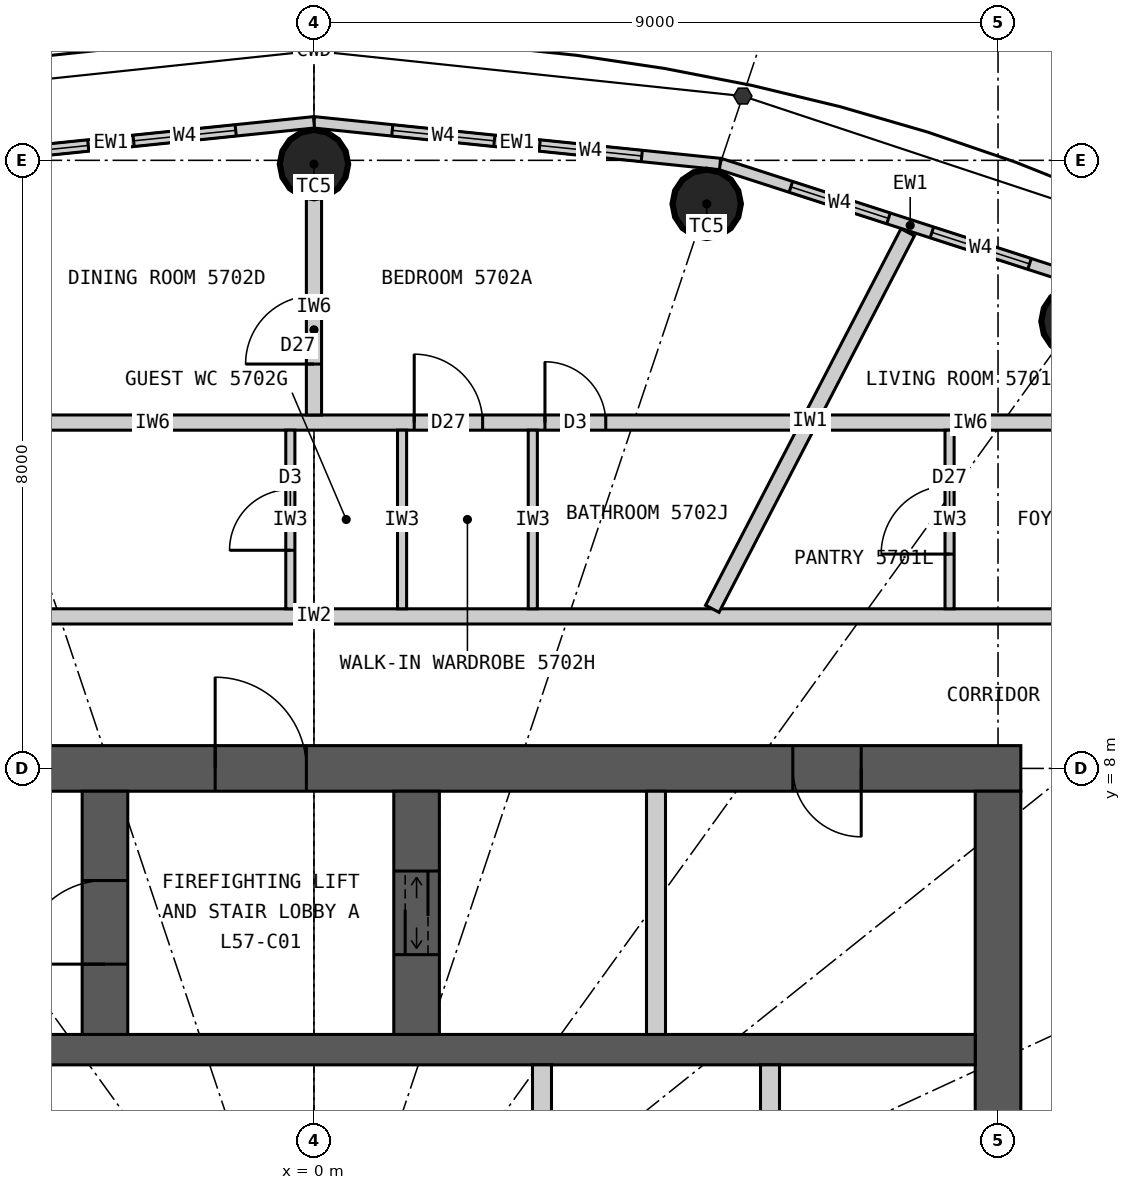
"""IFC4 building model, lengths in metres.
Left out: names, types, materials, properties, quantities, classifications, styles, units other than length and angle.
Written with IfcOpenShell. Run it as: python <this file> out.ifc"""

import sys

from ifc_helpers import new_model, si_unit, direction, frame, frame_2d, origin, origin_2d, place, context, subcontext, project, spatial, rectangle, circle, extrude, element, fill, save


model = new_model("IFC4")
c1 = context("Model", 3, precision=1e-05, world=origin(), true_north=direction((0.0, 1.0)))
c2 = subcontext(c1, "Body", "Model", "MODEL_VIEW")
j1 = project(units=[si_unit("LENGTHUNIT", "METRE"), si_unit("PLANEANGLEUNIT", "RADIAN")], contexts=[c1])
p1 = place(None, origin())
s1 = spatial("IfcSite", under=j1, at=p1, CompositionType="ELEMENT")
p2 = place(p1, origin())
s2 = spatial("IfcBuilding", under=s1, at=p2, CompositionType="ELEMENT")
p3 = place(p2, frame((0.0, 0.0, 212.7)))
s3 = spatial("IfcBuildingStorey", under=s2, at=p3, CompositionType="ELEMENT", Elevation=212.7)
for number, where, z_axis, x_axis in (
    (1, (10.019, 13.883, 0.0), (0.0, 0.0, 1.0), (1.0, 0.0, 0.0)),
    (2, (5.167, 15.427, 0.0), (0.0, 0.0, 1.0), (1.0, 0.0, 0.0)),
    (3, (0.0, 15.95, 0.0), (0.0, 0.0, 1.0), (1.0, 0.0, 0.0)),
):
    element("IfcColumn", number, at=place(p3, frame(where, z_axis=z_axis, x_axis=x_axis)), inside=s3, PredefinedType="COLUMN", context=c2, shape_type="SweptSolid", body=[
        extrude(circle(Radius=0.45, at=origin_2d()), origin(), (0.0, 0.0, 1.0), 3.3),
    ])
p4 = place(p3, frame((-9.3, 8.0, 0.0), z_axis=(0.0, 0.0, 1.0), x_axis=(1.0, 0.0, 0.0)))
e4 = element("IfcWall", 4, at=p4, inside=s3, PredefinedType="SHEAR", context=c2, shape_type="SweptSolid", body=[
    extrude(rectangle(XDim=18.6, YDim=0.6, at=frame_2d((9.3, 0.0))), origin(), (0.0, 0.0, 1.0), 3.3),
])
p5 = place(p4, frame((8.0, 0.0, 0.0)))
e5 = element("IfcOpeningElement", 5, at=p5, cuts=e4, PredefinedType="OPENING", context=c2, shape_type="SweptSolid", body=[
    extrude(rectangle(XDim=1.2, YDim=2.2, at=frame_2d((0.6, 1.1))), frame((0.0, 0.31, 0.0), z_axis=(0.0, -1.0, 0.0), x_axis=(1.0, 0.0, 0.0)), (0.0, 0.0, 1.0), 0.62),
])
p6 = place(p4, frame((15.6, 0.0, 0.0)))
e6 = element("IfcOpeningElement", 6, at=p6, cuts=e4, PredefinedType="OPENING", context=c2, shape_type="SweptSolid", body=[
    extrude(rectangle(XDim=0.9, YDim=2.2, at=frame_2d((0.45, 1.1))), frame((0.0, 0.31, 0.0), z_axis=(0.0, -1.0, 0.0), x_axis=(1.0, 0.0, 0.0)), (0.0, 0.0, 1.0), 0.62),
])
p7 = place(p3, frame((9.0, -7.7, 0.0), z_axis=(0.0, 0.0, 1.0), x_axis=(0.0, 1.0, 0.0)))
e7 = element("IfcWall", 7, at=p7, inside=s3, PredefinedType="SHEAR", context=c2, shape_type="SweptSolid", body=[
    extrude(rectangle(XDim=15.4, YDim=0.6, at=frame_2d((7.7, 0.0))), origin(), (0.0, 0.0, 1.0), 3.3),
])
p8 = place(p7, frame((6.8, 0.0, 0.0)))
e8 = element("IfcOpeningElement", 8, at=p8, cuts=e7, PredefinedType="OPENING", context=c2, shape_type="SweptSolid", body=[
    extrude(rectangle(XDim=1.8, YDim=2.2, at=frame_2d((0.9, 1.1))), frame((0.0, 0.31, 0.0), z_axis=(0.0, -1.0, 0.0), x_axis=(1.0, 0.0, 0.0)), (0.0, 0.0, 1.0), 0.62),
])
p9 = place(p3, frame((-8.7, 4.3, 0.0), z_axis=(0.0, 0.0, 1.0), x_axis=(1.0, 0.0, 0.0)))
e9 = element("IfcWall", 9, at=p9, inside=s3, PredefinedType="SHEAR", context=c2, shape_type="SweptSolid", body=[
    extrude(rectangle(XDim=17.4, YDim=0.4, at=frame_2d((8.7, 0.0))), origin(), (0.0, 0.0, 1.0), 3.3),
])
p10 = place(p3, frame((-2.75, 4.5, 0.0), z_axis=(0.0, 0.0, 1.0), x_axis=(0.0, 1.0, 0.0)))
e10 = element("IfcWall", 10, at=p10, inside=s3, PredefinedType="SHEAR", context=c2, shape_type="SweptSolid", body=[
    extrude(rectangle(XDim=3.2, YDim=0.6, at=frame_2d((1.6, 0.0))), origin(), (0.0, 0.0, 1.0), 3.3),
])
p11 = place(p10, frame((0.925, 0.0, 0.0)))
e11 = element("IfcOpeningElement", 11, at=p11, cuts=e10, PredefinedType="OPENING", context=c2, shape_type="SweptSolid", body=[
    extrude(rectangle(XDim=1.1, YDim=2.2, at=frame_2d((0.55, 1.1))), frame((0.0, 0.31, 0.0), z_axis=(0.0, -1.0, 0.0), x_axis=(1.0, 0.0, 0.0)), (0.0, 0.0, 1.0), 0.62),
])
p12 = place(p3, frame((1.35, 4.5, 0.0), z_axis=(0.0, 0.0, 1.0), x_axis=(0.0, 1.0, 0.0)))
e12 = element("IfcWall", 12, at=p12, inside=s3, PredefinedType="SHEAR", context=c2, shape_type="SweptSolid", body=[
    extrude(rectangle(XDim=3.2, YDim=0.6, at=frame_2d((1.6, 0.0))), origin(), (0.0, 0.0, 1.0), 3.3),
])
p13 = place(p12, frame((1.05, 0.0, 0.0)))
e13 = element("IfcOpeningElement", 13, at=p13, cuts=e12, PredefinedType="OPENING", context=c2, shape_type="SweptSolid", body=[
    extrude(rectangle(XDim=1.1, YDim=2.2, at=frame_2d((0.55, 1.1))), frame((0.0, 0.31, 0.0), z_axis=(0.0, -1.0, 0.0), x_axis=(1.0, 0.0, 0.0)), (0.0, 0.0, 1.0), 0.62),
])
p14 = place(p3, frame((4.5, 4.5, 0.0), z_axis=(0.0, 0.0, 1.0), x_axis=(0.0, 1.0, 0.0)))
e14 = element("IfcWall", 14, at=p14, inside=s3, PredefinedType="PARTITIONING", context=c2, shape_type="SweptSolid", body=[
    extrude(rectangle(XDim=3.2, YDim=0.25, at=frame_2d((1.6, 0.0))), origin(), (0.0, 0.0, 1.0), 3.3),
])
for number, where, z_axis, x_axis in (
    (15, (3.0, 1.75, 0.0), (0.0, 0.0, 1.0), (0.0, 1.0, 0.0)),
    (16, (6.0, 1.75, 0.0), (0.0, 0.0, 1.0), (0.0, 1.0, 0.0)),
):
    element("IfcWall", number, at=place(p3, frame(where, z_axis=z_axis, x_axis=x_axis)), inside=s3, PredefinedType="PARTITIONING", context=c2, shape_type="SweptSolid", body=[
        extrude(rectangle(XDim=2.35, YDim=0.25, at=frame_2d((1.175, 0.0))), origin(), (0.0, 0.0, 1.0), 3.3),
    ])
p15 = place(p3, frame((10.346, 14.336, 0.0), z_axis=(0.0, 0.0, 1.0), x_axis=(-0.951644702515, 0.307200846638, 0.0)))
e17 = element("IfcWall", 17, at=p15, inside=s3, PredefinedType="ELEMENTEDWALL", context=c2, shape_type="SweptSolid", body=[
    extrude(rectangle(XDim=5.258, YDim=0.15, at=frame_2d((2.629, 0.0))), origin(), (0.0, 0.0, 1.0), 3.12),
])
p16 = place(p15, frame((0.979, 0.0, 0.9)))
e18 = element("IfcOpeningElement", 18, at=p16, cuts=e17, PredefinedType="OPENING", context=c2, shape_type="SweptSolid", body=[
    extrude(rectangle(XDim=1.35, YDim=1.9, at=frame_2d((0.675, 0.95))), frame((0.0, 0.085, 0.0), z_axis=(0.0, -1.0, 0.0), x_axis=(1.0, 0.0, 0.0)), (0.0, 0.0, 1.0), 0.17),
])
p17 = place(p15, frame((2.929, 0.0, 0.9)))
e19 = element("IfcOpeningElement", 19, at=p17, cuts=e17, PredefinedType="OPENING", context=c2, shape_type="SweptSolid", body=[
    extrude(rectangle(XDim=1.35, YDim=1.9, at=frame_2d((0.675, 0.95))), frame((0.0, 0.085, 0.0), z_axis=(0.0, -1.0, 0.0), x_axis=(1.0, 0.0, 0.0)), (0.0, 0.0, 1.0), 0.17),
])
p18 = place(p3, frame((5.343, 15.952, 0.0), z_axis=(0.0, 0.0, 1.0), x_axis=(-0.994774574972, 0.102095763818, 0.0)))
e20 = element("IfcWall", 20, at=p18, inside=s3, PredefinedType="ELEMENTEDWALL", context=c2, shape_type="SweptSolid", body=[
    extrude(rectangle(XDim=5.371, YDim=0.15, at=frame_2d((2.686, 0.0))), origin(), (0.0, 0.0, 1.0), 3.12),
])
p19 = place(p18, frame((1.035, 0.0, 0.9)))
e21 = element("IfcOpeningElement", 21, at=p19, cuts=e20, PredefinedType="OPENING", context=c2, shape_type="SweptSolid", body=[
    extrude(rectangle(XDim=1.35, YDim=1.9, at=frame_2d((0.675, 0.95))), frame((0.0, 0.085, 0.0), z_axis=(0.0, -1.0, 0.0), x_axis=(1.0, 0.0, 0.0)), (0.0, 0.0, 1.0), 0.17),
])
p20 = place(p18, frame((2.985, 0.0, 0.9)))
e22 = element("IfcOpeningElement", 22, at=p20, cuts=e20, PredefinedType="OPENING", context=c2, shape_type="SweptSolid", body=[
    extrude(rectangle(XDim=1.35, YDim=1.9, at=frame_2d((0.675, 0.95))), frame((0.0, 0.085, 0.0), z_axis=(0.0, -1.0, 0.0), x_axis=(1.0, 0.0, 0.0)), (0.0, 0.0, 1.0), 0.17),
])
p21 = place(p3, frame((0.0, 16.5, 0.0), z_axis=(0.0, 0.0, 1.0), x_axis=(-0.994774574972, -0.102095763818, 0.0)))
e23 = element("IfcWall", 23, at=p21, inside=s3, PredefinedType="ELEMENTEDWALL", context=c2, shape_type="SweptSolid", body=[
    extrude(rectangle(XDim=5.371, YDim=0.15, at=frame_2d((2.686, 0.0))), origin(), (0.0, 0.0, 1.0), 3.12),
])
p22 = place(p21, frame((1.035, 0.0, 0.9)))
e24 = element("IfcOpeningElement", 24, at=p22, cuts=e23, PredefinedType="OPENING", context=c2, shape_type="SweptSolid", body=[
    extrude(rectangle(XDim=1.35, YDim=1.9, at=frame_2d((0.675, 0.95))), frame((0.0, 0.085, 0.0), z_axis=(0.0, -1.0, 0.0), x_axis=(1.0, 0.0, 0.0)), (0.0, 0.0, 1.0), 0.17),
])
p23 = place(p21, frame((2.985, 0.0, 0.9)))
e25 = element("IfcOpeningElement", 25, at=p23, cuts=e23, PredefinedType="OPENING", context=c2, shape_type="SweptSolid", body=[
    extrude(rectangle(XDim=1.35, YDim=1.9, at=frame_2d((0.675, 0.95))), frame((0.0, 0.085, 0.0), z_axis=(0.0, -1.0, 0.0), x_axis=(1.0, 0.0, 0.0)), (0.0, 0.0, 1.0), 0.17),
])
p24 = place(p3, frame((-11.1, 10.0, 0.0), z_axis=(0.0, 0.0, 1.0), x_axis=(1.0, 0.0, 0.0)))
e26 = element("IfcWall", 26, at=p24, inside=s3, PredefinedType="PARTITIONING", context=c2, shape_type="SweptSolid", body=[
    extrude(rectangle(XDim=22.2, YDim=0.2, at=frame_2d((11.1, 0.0))), origin(), (0.0, 0.0, 1.0), 3.12),
])
p25 = place(p24, frame((20.9, 0.0, 0.0)))
e27 = element("IfcOpeningElement", 27, at=p25, cuts=e26, PredefinedType="OPENING", context=c2, shape_type="SweptSolid", body=[
    extrude(rectangle(XDim=1.0, YDim=2.2, at=frame_2d((0.5, 1.1))), frame((0.0, 0.11, 0.0), z_axis=(0.0, -1.0, 0.0), x_axis=(1.0, 0.0, 0.0)), (0.0, 0.0, 1.0), 0.22),
])
p26 = place(p24, frame((4.329, 0.0, 0.0)))
e28 = element("IfcOpeningElement", 28, at=p26, cuts=e26, PredefinedType="OPENING", context=c2, shape_type="SweptSolid", body=[
    extrude(rectangle(XDim=1.0, YDim=2.2, at=frame_2d((0.5, 1.1))), frame((0.0, 0.11, 0.0), z_axis=(0.0, -1.0, 0.0), x_axis=(1.0, 0.0, 0.0)), (0.0, 0.0, 1.0), 0.22),
])
p27 = place(p3, frame((5.241, 10.1, 0.0), z_axis=(0.0, 0.0, 1.0), x_axis=(0.460603196597, 0.887606160008, 0.0)))
e29 = element("IfcWall", 29, at=p27, inside=s3, PredefinedType="PARTITIONING", context=c2, shape_type="SweptSolid", body=[
    extrude(rectangle(XDim=5.58, YDim=0.2, at=frame_2d((2.79, 0.0))), origin(), (0.0, 0.0, 1.0), 3.12),
])
p28 = place(p3, frame((10.609, 12.55, 0.0), z_axis=(0.0, 0.0, 1.0), x_axis=(-1.0, 0.0, 0.0)))
e30 = element("IfcWall", 30, at=p28, inside=s3, PredefinedType="PARTITIONING", context=c2, shape_type="SweptSolid", body=[
    extrude(rectangle(XDim=3.947, YDim=0.2, at=frame_2d((1.974, 0.0))), origin(), (0.0, 0.0, 1.0), 3.12),
])
p29 = place(p3, frame((8.363, 10.1, 0.0), z_axis=(0.0, 0.0, 1.0), x_axis=(0.0, 1.0, 0.0)))
e31 = element("IfcWall", 31, at=p29, inside=s3, PredefinedType="PARTITIONING", context=c2, shape_type="SweptSolid", body=[
    extrude(rectangle(XDim=2.35, YDim=0.12, at=frame_2d((1.175, 0.0))), origin(), (0.0, 0.0, 1.0), 3.12),
])
p30 = place(p29, frame((0.72, 0.0, 0.0)))
e32 = element("IfcOpeningElement", 32, at=p30, cuts=e31, PredefinedType="OPENING", context=c2, shape_type="SweptSolid", body=[
    extrude(rectangle(XDim=0.9, YDim=2.1, at=frame_2d((0.45, 1.05))), frame((0.0, 0.07, 0.0), z_axis=(0.0, -1.0, 0.0), x_axis=(1.0, 0.0, 0.0)), (0.0, 0.0, 1.0), 0.14),
])
p31 = place(p3, frame((6.364, 12.55, 0.0), z_axis=(0.0, 0.0, 1.0), x_axis=(-1.0, 0.0, 0.0)))
e33 = element("IfcWall", 33, at=p31, inside=s3, PredefinedType="PARTITIONING", context=c2, shape_type="SweptSolid", body=[
    extrude(rectangle(XDim=16.972, YDim=0.2, at=frame_2d((8.486, 0.0))), origin(), (0.0, 0.0, 1.0), 3.12),
])
p32 = place(p31, frame((2.525, 0.0, 0.0)))
e34 = element("IfcOpeningElement", 34, at=p32, cuts=e33, PredefinedType="OPENING", context=c2, shape_type="SweptSolid", body=[
    extrude(rectangle(XDim=0.8, YDim=2.1, at=frame_2d((0.4, 1.05))), frame((0.0, 0.11, 0.0), z_axis=(0.0, -1.0, 0.0), x_axis=(1.0, 0.0, 0.0)), (0.0, 0.0, 1.0), 0.22),
])
p33 = place(p31, frame((4.145, 0.0, 0.0)))
e35 = element("IfcOpeningElement", 35, at=p33, cuts=e33, PredefinedType="OPENING", context=c2, shape_type="SweptSolid", body=[
    extrude(rectangle(XDim=0.9, YDim=2.1, at=frame_2d((0.45, 1.05))), frame((0.0, 0.11, 0.0), z_axis=(0.0, -1.0, 0.0), x_axis=(1.0, 0.0, 0.0)), (0.0, 0.0, 1.0), 0.22),
])
p34 = place(p31, frame((13.52, 0.0, 0.0)))
e36 = element("IfcOpeningElement", 36, at=p34, cuts=e33, PredefinedType="OPENING", context=c2, shape_type="SweptSolid", body=[
    extrude(rectangle(XDim=0.9, YDim=2.1, at=frame_2d((0.45, 1.05))), frame((0.0, 0.11, 0.0), z_axis=(0.0, -1.0, 0.0), x_axis=(1.0, 0.0, 0.0)), (0.0, 0.0, 1.0), 0.22),
])
p35 = place(p3, frame((0.0, 12.65, 0.0), z_axis=(0.0, 0.0, 1.0), x_axis=(0.0, 1.0, 0.0)))
e37 = element("IfcWall", 37, at=p35, inside=s3, PredefinedType="PARTITIONING", context=c2, shape_type="SweptSolid", body=[
    extrude(rectangle(XDim=2.85, YDim=0.2, at=frame_2d((1.425, 0.0))), origin(), (0.0, 0.0, 1.0), 2.42),
])
p36 = place(p35, frame((0.67, 0.0, 0.0)))
e38 = element("IfcOpeningElement", 38, at=p36, cuts=e37, PredefinedType="OPENING", context=c2, shape_type="SweptSolid", body=[
    extrude(rectangle(XDim=0.9, YDim=2.1, at=frame_2d((0.45, 1.05))), frame((0.0, 0.11, 0.0), z_axis=(0.0, -1.0, 0.0), x_axis=(1.0, 0.0, 0.0)), (0.0, 0.0, 1.0), 0.22),
])
for number, where, z_axis, x_axis in (
    (39, (2.879, 10.1, 0.0), (0.0, 0.0, 1.0), (0.0, 1.0, 0.0)),
    (40, (1.159, 10.1, 0.0), (0.0, 0.0, 1.0), (0.0, 1.0, 0.0)),
):
    element("IfcWall", number, at=place(p3, frame(where, z_axis=z_axis, x_axis=x_axis)), inside=s3, PredefinedType="PARTITIONING", context=c2, shape_type="SweptSolid", body=[
        extrude(rectangle(XDim=2.35, YDim=0.12, at=frame_2d((1.175, 0.0))), origin(), (0.0, 0.0, 1.0), 3.12),
    ])
p37 = place(p3, frame((-0.311, 10.1, 0.0), z_axis=(0.0, 0.0, 1.0), x_axis=(0.0, 1.0, 0.0)))
e41 = element("IfcWall", 41, at=p37, inside=s3, PredefinedType="PARTITIONING", context=c2, shape_type="SweptSolid", body=[
    extrude(rectangle(XDim=2.35, YDim=0.12, at=frame_2d((1.175, 0.0))), origin(), (0.0, 0.0, 1.0), 3.12),
])
p38 = place(p37, frame((0.77, 0.0, 0.0)))
e42 = element("IfcOpeningElement", 42, at=p38, cuts=e41, PredefinedType="OPENING", context=c2, shape_type="SweptSolid", body=[
    extrude(rectangle(XDim=0.8, YDim=2.1, at=frame_2d((0.4, 1.05))), frame((0.0, 0.07, 0.0), z_axis=(0.0, -1.0, 0.0), x_axis=(1.0, 0.0, 0.0)), (0.0, 0.0, 1.0), 0.14),
])
p39 = place(p16, origin())
e43 = element("IfcWindow", 43, at=p39, inside=s3, PartitioningType="SINGLE_PANEL", PredefinedType="WINDOW", context=c2, shape_type="SweptSolid", body=[
    extrude(rectangle(XDim=1.35, YDim=1.9, at=frame_2d((0.675, 0.95))), frame((0.0, 0.03, 0.0), z_axis=(0.0, -1.0, 0.0), x_axis=(1.0, 0.0, 0.0)), (0.0, 0.0, 1.0), 0.06),
])
fill(e18, e43)
p40 = place(p17, origin())
e44 = element("IfcWindow", 44, at=p40, inside=s3, PartitioningType="SINGLE_PANEL", PredefinedType="WINDOW", context=c2, shape_type="SweptSolid", body=[
    extrude(rectangle(XDim=1.35, YDim=1.9, at=frame_2d((0.675, 0.95))), frame((0.0, 0.03, 0.0), z_axis=(0.0, -1.0, 0.0), x_axis=(1.0, 0.0, 0.0)), (0.0, 0.0, 1.0), 0.06),
])
fill(e19, e44)
p41 = place(p19, origin())
e45 = element("IfcWindow", 45, at=p41, inside=s3, PartitioningType="SINGLE_PANEL", PredefinedType="WINDOW", context=c2, shape_type="SweptSolid", body=[
    extrude(rectangle(XDim=1.35, YDim=1.9, at=frame_2d((0.675, 0.95))), frame((0.0, 0.03, 0.0), z_axis=(0.0, -1.0, 0.0), x_axis=(1.0, 0.0, 0.0)), (0.0, 0.0, 1.0), 0.06),
])
fill(e21, e45)
p42 = place(p20, origin())
e46 = element("IfcWindow", 46, at=p42, inside=s3, PartitioningType="SINGLE_PANEL", PredefinedType="WINDOW", context=c2, shape_type="SweptSolid", body=[
    extrude(rectangle(XDim=1.35, YDim=1.9, at=frame_2d((0.675, 0.95))), frame((0.0, 0.03, 0.0), z_axis=(0.0, -1.0, 0.0), x_axis=(1.0, 0.0, 0.0)), (0.0, 0.0, 1.0), 0.06),
])
fill(e22, e46)
p43 = place(p22, origin())
e47 = element("IfcWindow", 47, at=p43, inside=s3, PartitioningType="SINGLE_PANEL", PredefinedType="WINDOW", context=c2, shape_type="SweptSolid", body=[
    extrude(rectangle(XDim=1.35, YDim=1.9, at=frame_2d((0.675, 0.95))), frame((0.0, 0.03, 0.0), z_axis=(0.0, -1.0, 0.0), x_axis=(1.0, 0.0, 0.0)), (0.0, 0.0, 1.0), 0.06),
])
fill(e24, e47)
p44 = place(p23, origin())
e48 = element("IfcWindow", 48, at=p44, inside=s3, PartitioningType="SINGLE_PANEL", PredefinedType="WINDOW", context=c2, shape_type="SweptSolid", body=[
    extrude(rectangle(XDim=1.35, YDim=1.9, at=frame_2d((0.675, 0.95))), frame((0.0, 0.03, 0.0), z_axis=(0.0, -1.0, 0.0), x_axis=(1.0, 0.0, 0.0)), (0.0, 0.0, 1.0), 0.06),
])
fill(e25, e48)
p45 = place(p30, origin())
e49 = element("IfcDoor", 49, at=p45, inside=s3, OperationType="SINGLE_SWING_LEFT", PredefinedType="DOOR", context=c2, shape_type="SweptSolid", body=[
    extrude(rectangle(XDim=0.9, YDim=2.1, at=frame_2d((0.45, 1.05))), frame((0.0, 0.025, 0.0), z_axis=(0.0, -1.0, 0.0), x_axis=(1.0, 0.0, 0.0)), (0.0, 0.0, 1.0), 0.05),
])
fill(e32, e49)
p46 = place(p32, origin())
e50 = element("IfcDoor", 50, at=p46, inside=s3, OperationType="SINGLE_SWING_RIGHT", PredefinedType="DOOR", context=c2, shape_type="SweptSolid", body=[
    extrude(rectangle(XDim=0.8, YDim=2.1, at=frame_2d((0.4, 1.05))), frame((0.0, 0.025, 0.0), z_axis=(0.0, -1.0, 0.0), x_axis=(1.0, 0.0, 0.0)), (0.0, 0.0, 1.0), 0.05),
])
fill(e34, e50)
p47 = place(p33, origin())
e51 = element("IfcDoor", 51, at=p47, inside=s3, OperationType="SINGLE_SWING_RIGHT", PredefinedType="DOOR", context=c2, shape_type="SweptSolid", body=[
    extrude(rectangle(XDim=0.9, YDim=2.1, at=frame_2d((0.45, 1.05))), frame((0.0, 0.025, 0.0), z_axis=(0.0, -1.0, 0.0), x_axis=(1.0, 0.0, 0.0)), (0.0, 0.0, 1.0), 0.05),
])
fill(e35, e51)
p48 = place(p38, origin())
e52 = element("IfcDoor", 52, at=p48, inside=s3, OperationType="SINGLE_SWING_LEFT", PredefinedType="DOOR", context=c2, shape_type="SweptSolid", body=[
    extrude(rectangle(XDim=0.8, YDim=2.1, at=frame_2d((0.4, 1.05))), frame((0.0, 0.025, 0.0), z_axis=(0.0, -1.0, 0.0), x_axis=(1.0, 0.0, 0.0)), (0.0, 0.0, 1.0), 0.05),
])
fill(e42, e52)
p49 = place(p36, origin())
e53 = element("IfcDoor", 53, at=p49, inside=s3, OperationType="SINGLE_SWING_LEFT", PredefinedType="DOOR", context=c2, shape_type="SweptSolid", body=[
    extrude(rectangle(XDim=0.9, YDim=2.1, at=frame_2d((0.45, 1.05))), frame((0.0, 0.025, 0.0), z_axis=(0.0, -1.0, 0.0), x_axis=(1.0, 0.0, 0.0)), (0.0, 0.0, 1.0), 0.05),
])
fill(e38, e53)
p50 = place(p5, origin())
e54 = element("IfcDoor", 54, at=p50, inside=s3, OperationType="SINGLE_SWING_LEFT", PredefinedType="DOOR", context=c2, shape_type="SweptSolid", body=[
    extrude(rectangle(XDim=1.2, YDim=2.2, at=frame_2d((0.6, 1.1))), frame((0.0, 0.025, 0.0), z_axis=(0.0, -1.0, 0.0), x_axis=(1.0, 0.0, 0.0)), (0.0, 0.0, 1.0), 0.05),
])
fill(e5, e54)
p51 = place(p11, origin())
e55 = element("IfcDoor", 55, at=p51, inside=s3, OperationType="SINGLE_SWING_LEFT", PredefinedType="DOOR", context=c2, shape_type="SweptSolid", body=[
    extrude(rectangle(XDim=1.1, YDim=2.2, at=frame_2d((0.55, 1.1))), frame((0.0, 0.025, 0.0), z_axis=(0.0, -1.0, 0.0), x_axis=(1.0, 0.0, 0.0)), (0.0, 0.0, 1.0), 0.05),
])
fill(e11, e55)
p52 = place(p13, origin())
e56 = element("IfcDoor", 56, at=p52, inside=s3, OperationType="DOUBLE_DOOR_SLIDING", PredefinedType="DOOR", context=c2, shape_type="SweptSolid", body=[
    extrude(rectangle(XDim=1.1, YDim=2.2, at=frame_2d((0.55, 1.1))), frame((0.0, 0.025, 0.0), z_axis=(0.0, -1.0, 0.0), x_axis=(1.0, 0.0, 0.0)), (0.0, 0.0, 1.0), 0.05),
])
fill(e13, e56)
p53 = place(p6, origin())
e57 = element("IfcDoor", 57, at=p53, inside=s3, OperationType="SINGLE_SWING_RIGHT", PredefinedType="DOOR", context=c2, shape_type="SweptSolid", body=[
    extrude(rectangle(XDim=0.9, YDim=2.2, at=frame_2d((0.45, 1.1))), frame((0.0, 0.025, 0.0), z_axis=(0.0, -1.0, 0.0), x_axis=(1.0, 0.0, 0.0)), (0.0, 0.0, 1.0), 0.05),
])
fill(e6, e57)
save(model, sys.argv[1])
